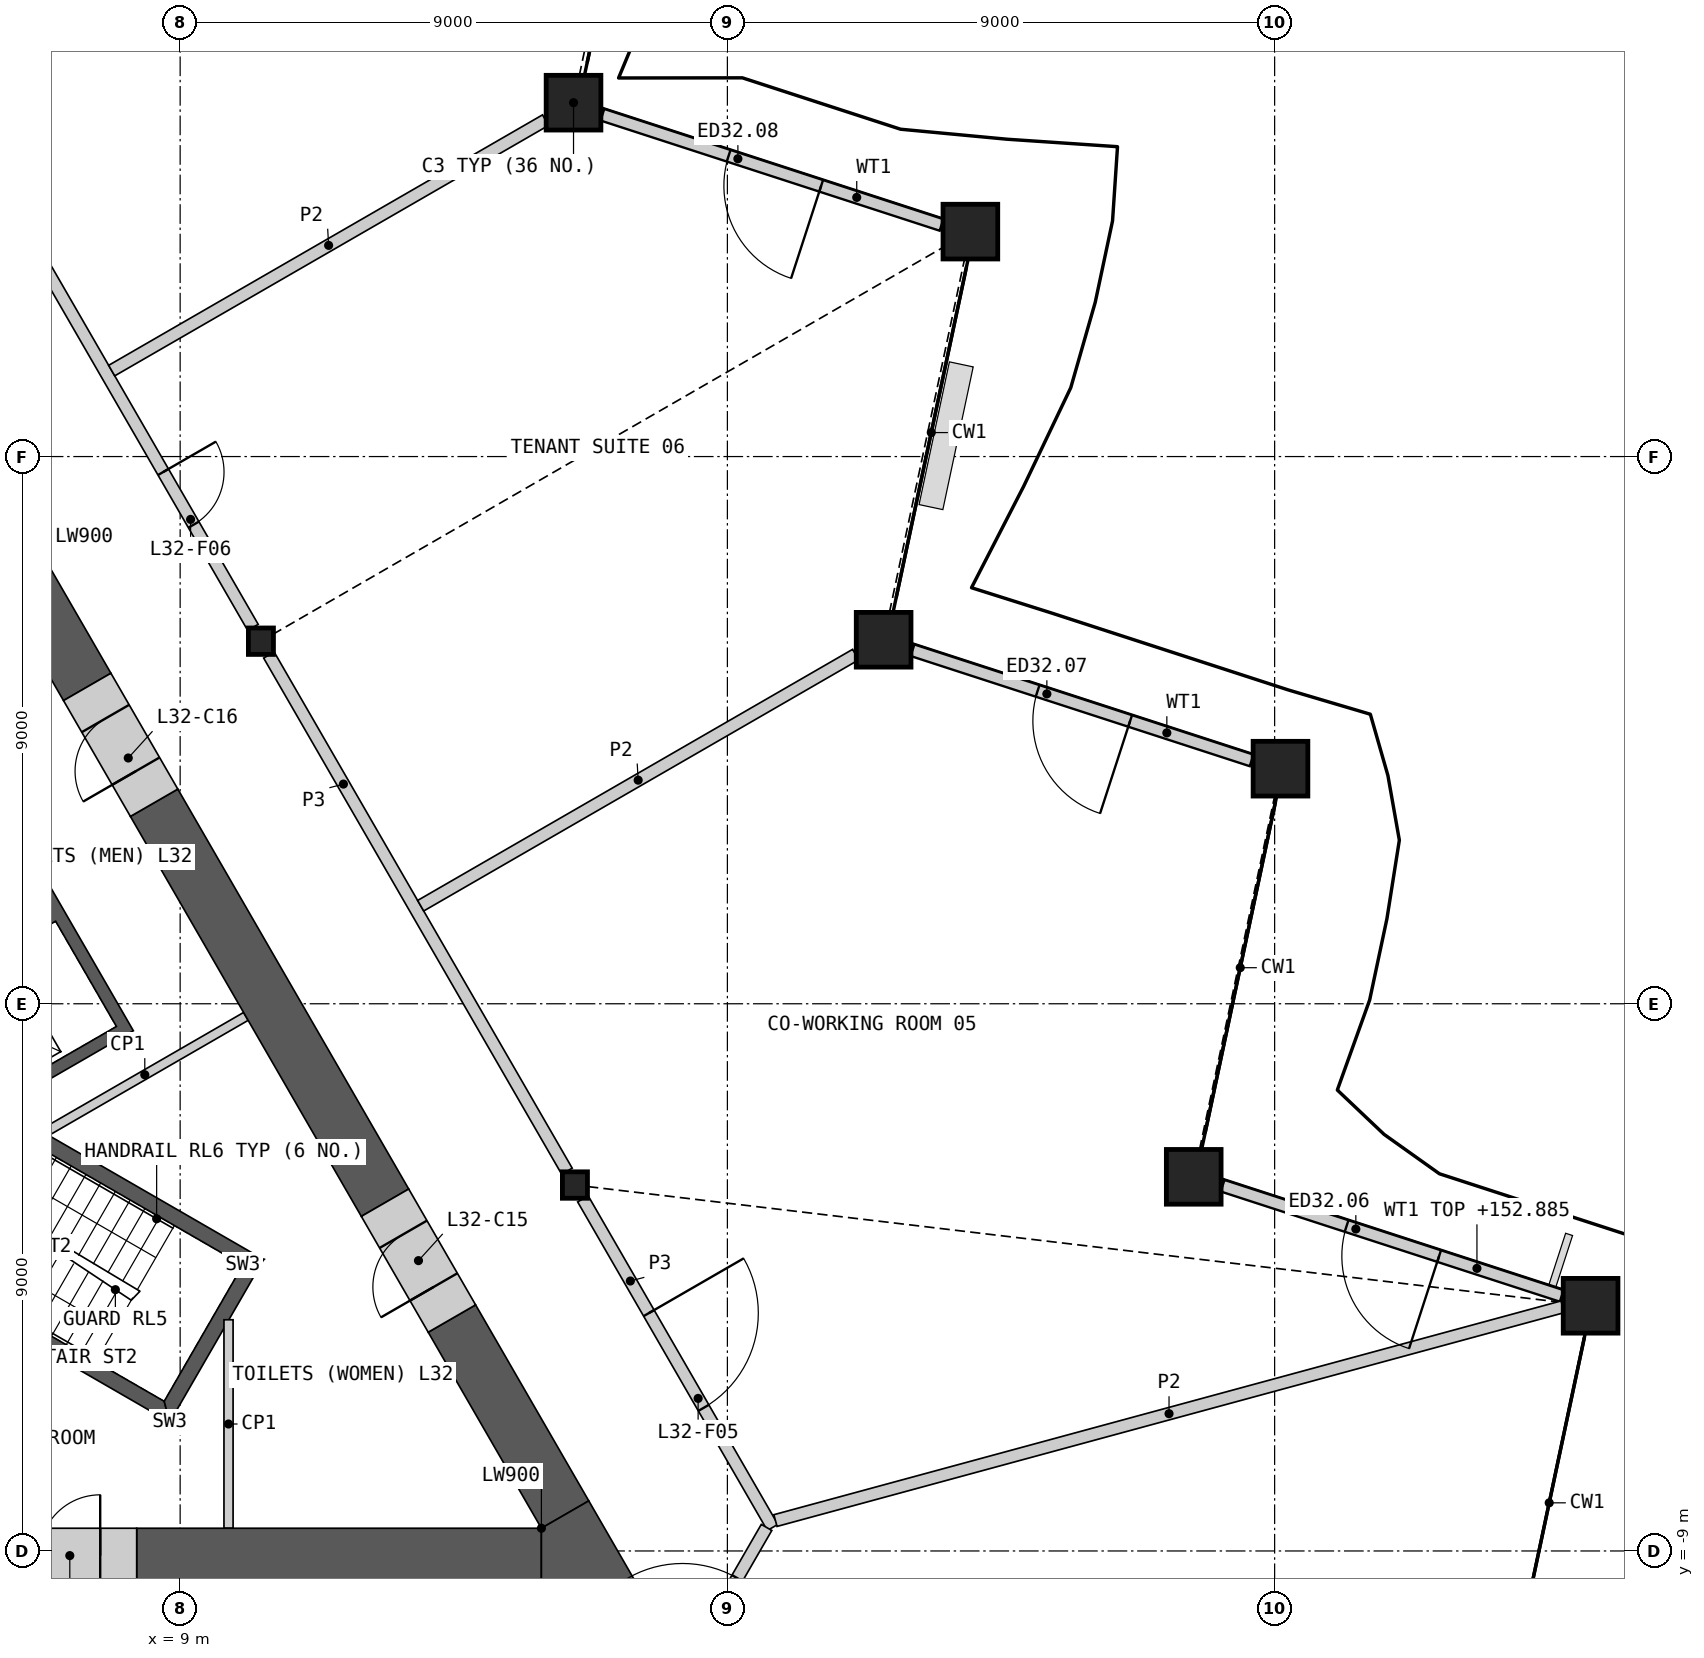
"""IFC4 building model, lengths in metres.
Left out: names, types, materials, properties, quantities, classifications, styles, units other than length and angle.
Written with IfcOpenShell. Run it as: python <this file> out.ifc"""

import sys

from ifc_helpers import new_model, si_unit, direction, frame, frame_2d, origin, origin_2d, place, context, subcontext, project, spatial, polyline, rectangle, hollow_rectangle, i_section, outline, extrude, element, fill, save


model = new_model("IFC4")
c1 = context("Model", 3, precision=1e-05, world=origin(), true_north=direction((0.0, 1.0)))
c2 = subcontext(c1, "Body", "Model", "MODEL_VIEW")
j1 = project(units=[si_unit("LENGTHUNIT", "METRE"), si_unit("PLANEANGLEUNIT", "RADIAN")], contexts=[c1])
p1 = place(None, origin())
s1 = spatial("IfcSite", under=j1, at=p1, CompositionType="ELEMENT")
p2 = place(p1, origin())
s2 = spatial("IfcBuilding", under=s1, at=p2, CompositionType="ELEMENT")
p3 = place(p2, frame((0.0, 0.0, 150.0)))
s3 = spatial("IfcBuildingStorey", under=s2, at=p3, CompositionType="ELEMENT", Elevation=150.0)
for number, where, z_axis, x_axis in (
    (1, (32.196, -4.967, 0.0), (0.0, 0.0, 1.0), (1.0, 0.0, 0.0)),
    (2, (25.669, -2.846, 0.0), (0.0, 0.0, 1.0), (1.0, 0.0, 0.0)),
    (3, (27.096, 3.866, 0.0), (0.0, 0.0, 1.0), (1.0, 0.0, 0.0)),
    (4, (20.57, 5.987, 0.0), (0.0, 0.0, 1.0), (1.0, 0.0, 0.0)),
    (5, (21.996, 12.699, 0.0), (0.0, 0.0, 1.0), (1.0, 0.0, 0.0)),
    (6, (15.469, 14.82, 0.0), (0.0, 0.0, 1.0), (1.0, 0.0, 0.0)),
):
    element("IfcColumn", number, at=place(p3, frame(where, z_axis=z_axis, x_axis=x_axis)), inside=s3, PredefinedType="COLUMN", context=c2, shape_type="SweptSolid", body=[
        extrude(hollow_rectangle(XDim=0.9, YDim=0.9, WallThickness=0.06, at=origin_2d()), origin(), (0.0, 0.0, 1.0), 4.2),
    ])
for number, where, z_axis, x_axis in (
    (7, (15.493, -2.982, 0.0), (0.0, 0.0, 1.0), (1.0, 0.0, 0.0)),
    (8, (10.328, 5.963, 0.0), (0.0, 0.0, 1.0), (1.0, 0.0, 0.0)),
):
    element("IfcColumn", number, at=place(p3, frame(where, z_axis=z_axis, x_axis=x_axis)), inside=s3, PredefinedType="COLUMN", context=c2, shape_type="SweptSolid", body=[
        extrude(i_section(OverallWidth=0.412, OverallDepth=0.435, WebThickness=0.036, FlangeThickness=0.057, at=origin_2d()), origin(), (0.0, 0.0, 1.0), 4.2),
    ])
p4 = place(p3, frame((31.721, -4.805, 0.0), z_axis=(0.0, 0.0, 1.0), x_axis=(-0.951053952554, 0.309024884649, 0.0)))
e9 = element("IfcWall", 9, at=p4, inside=s3, PredefinedType="SOLIDWALL", context=c2, shape_type="SweptSolid", body=[
    extrude(rectangle(XDim=5.865, YDim=0.2, at=frame_2d((2.932, 0.0))), origin(), (0.0, 0.0, 1.0), 2.885),
])
p5 = place(p4, frame((2.12, 0.0, 0.0)))
e10 = element("IfcOpeningElement", 10, at=p5, cuts=e9, PredefinedType="OPENING", context=c2, shape_type="SweptSolid", body=[
    extrude(rectangle(XDim=1.6, YDim=2.4, at=frame_2d((0.8, 1.2))), frame((0.0, 0.11, 0.0), z_axis=(0.0, -1.0, 0.0), x_axis=(1.0, 0.0, 0.0)), (0.0, 0.0, 1.0), 0.22),
])
p6 = place(p3, frame((26.622, 4.002, 0.0), z_axis=(0.0, 0.0, 1.0), x_axis=(-0.951053952554, 0.309024884649, 0.0)))
e11 = element("IfcWall", 11, at=p6, inside=s3, PredefinedType="SOLIDWALL", context=c2, shape_type="SweptSolid", body=[
    extrude(rectangle(XDim=5.865, YDim=0.2, at=frame_2d((2.932, 0.0))), origin(), (0.0, 0.0, 1.0), 3.189),
])
p7 = place(p6, frame((2.101, 0.0, 0.0)))
e12 = element("IfcOpeningElement", 12, at=p7, cuts=e11, PredefinedType="OPENING", context=c2, shape_type="SweptSolid", body=[
    extrude(rectangle(XDim=1.6, YDim=2.4, at=frame_2d((0.8, 1.2))), frame((0.0, 0.11, 0.0), z_axis=(0.0, -1.0, 0.0), x_axis=(1.0, 0.0, 0.0)), (0.0, 0.0, 1.0), 0.22),
])
p8 = place(p3, frame((21.521, 12.81, 0.0), z_axis=(0.0, 0.0, 1.0), x_axis=(-0.951049976734, 0.309037120351, 0.0)))
e13 = element("IfcWall", 13, at=p8, inside=s3, PredefinedType="SOLIDWALL", context=c2, shape_type="SweptSolid", body=[
    extrude(rectangle(XDim=5.864, YDim=0.2, at=frame_2d((2.932, 0.0))), origin(), (0.0, 0.0, 1.0), 3.189),
])
p9 = place(p8, frame((2.081, 0.0, 0.0)))
e14 = element("IfcOpeningElement", 14, at=p9, cuts=e13, PredefinedType="OPENING", context=c2, shape_type="SweptSolid", body=[
    extrude(rectangle(XDim=1.6, YDim=2.4, at=frame_2d((0.8, 1.2))), frame((0.0, 0.11, 0.0), z_axis=(0.0, -1.0, 0.0), x_axis=(1.0, 0.0, 0.0)), (0.0, 0.0, 1.0), 0.22),
])
p10 = place(p3, origin())
e15 = element("IfcWall", 15, at=p10, inside=s3, PredefinedType="SHEAR", context=c2, shape_type="SweptSolid", body=[
    extrude(outline(polyline([(1.561, 6.097), (3.731, 7.35), (8.231, -0.444), (6.061, -1.697), (5.96, -1.524), (7.952, -0.374), (6.952, 1.358), (4.96, 0.208), (4.861, 0.381), (6.852, 1.531), (5.852, 3.263), (3.861, 2.113), (3.76, 2.287), (5.752, 3.437), (4.752, 5.169), (2.76, 4.019), (2.66, 4.192), (4.652, 5.342), (3.652, 7.074), (1.66, 5.924), (1.561, 6.097)])), origin(), (0.0, 0.0, 1.0), 3.8),
])
p11 = place(p3, origin())
e16 = element("IfcWall", 16, at=p11, inside=s3, PredefinedType="SHEAR", context=c2, shape_type="SweptSolid", body=[
    extrude(outline(polyline([(3.763, -3.956), (8.83, -6.881), (8.738, -6.539), (3.888, -3.739), (3.763, -3.956)])), origin(), (0.0, 0.0, 1.0), 3.8),
])
p12 = place(p3, origin())
e17 = element("IfcWall", 17, at=p12, inside=s3, PredefinedType="SHEAR", context=c2, shape_type="SweptSolid", body=[
    extrude(outline(polyline([(8.83, -6.881), (10.374, -4.206), (10.032, -4.298), (8.738, -6.539), (8.83, -6.881)])), origin(), (0.0, 0.0, 1.0), 3.8),
])
p13 = place(p3, origin())
e18 = element("IfcWall", 18, at=p13, inside=s3, PredefinedType="SHEAR", context=c2, shape_type="SweptSolid", body=[
    extrude(outline(polyline([(10.032, -4.298), (10.374, -4.206), (5.307, -1.281), (5.182, -1.498), (10.032, -4.298)])), origin(), (0.0, 0.0, 1.0), 3.8),
])
p14 = place(p3, frame((10.081, -0.208, 0.0), z_axis=(0.0, 0.0, 1.0), x_axis=(-0.86600766878, -0.50003071667, 0.0)))
e19 = element("IfcWall", 19, at=p14, inside=s3, PredefinedType="PARTITIONING", context=c2, shape_type="SweptSolid", body=[
    extrude(rectangle(XDim=3.839, YDim=0.15, at=frame_2d((1.919, 0.0))), origin(), (0.0, 0.0, 1.0), 3.8),
])
p15 = place(p3, frame((9.796, -8.626, 0.0), z_axis=(0.0, 0.0, 1.0), x_axis=(0.0, 1.0, 0.0)))
e20 = element("IfcWall", 20, at=p15, inside=s3, PredefinedType="PARTITIONING", context=c2, shape_type="SweptSolid", body=[
    extrude(rectangle(XDim=3.429, YDim=0.15, at=frame_2d((1.714, 0.0))), origin(), (0.0, 0.0, 1.0), 3.8),
])
p16 = place(p3, frame((8.285, -9.076, 0.0), z_axis=(0.0, 0.0, 1.0), x_axis=(1.0, 0.0, 0.0)))
e21 = element("IfcWall", 21, at=p16, inside=s3, PredefinedType="SHEAR", context=c2, shape_type="SweptSolid", body=[
    extrude(rectangle(XDim=6.656, YDim=0.9, at=frame_2d((3.328, 0.0))), origin(), (0.0, 0.0, 1.0), 3.8),
])
p17 = place(p3, frame((12.369, -3.272, 0.0), z_axis=(0.0, 0.0, 1.0), x_axis=(-0.499986781806, 0.866033035178, 0.0)))
e22 = element("IfcWall", 22, at=p17, inside=s3, PredefinedType="SHEAR", context=c2, shape_type="SweptSolid", body=[
    extrude(rectangle(XDim=7.595, YDim=0.9, at=frame_2d((3.798, 0.0))), origin(), (0.0, 0.0, 1.0), 3.8),
])
p18 = place(p3, frame((7.472, 5.211, 0.0), z_axis=(0.0, 0.0, 1.0), x_axis=(-0.499996693808, 0.866027312607, 0.0)))
e23 = element("IfcWall", 23, at=p18, inside=s3, PredefinedType="SHEAR", context=c2, shape_type="SweptSolid", body=[
    extrude(rectangle(XDim=4.315, YDim=0.9, at=frame_2d((2.158, 0.0))), origin(), (0.0, 0.0, 1.0), 3.8),
])
p19 = place(p3, frame((15.331, -8.401, 0.0), z_axis=(0.0, 0.0, 1.0), x_axis=(-0.499976014784, 0.866039251212, 0.0)))
e24 = element("IfcWall", 24, at=p19, inside=s3, PredefinedType="SHEAR", context=c2, shape_type="SweptSolid", body=[
    extrude(rectangle(XDim=3.723, YDim=0.9, at=frame_2d((1.861, 0.0))), origin(), (0.0, 0.0, 1.0), 3.8),
])
p20 = place(p3, origin())
e25 = element("IfcWall", 25, at=p20, inside=s3, PredefinedType="SHEAR", context=c2, shape_type="SweptSolid", body=[
    extrude(outline(polyline([(14.941, -8.626), (15.721, -8.176), (16.5, -9.526), (14.941, -9.526), (14.941, -8.626)])), origin(), (0.0, 0.0, 1.0), 3.8),
])
p21 = place(p3, frame((6.085, -9.076, 0.0), z_axis=(0.0, 0.0, 1.0), x_axis=(1.0, 0.0, 0.0)))
e26 = element("IfcWall", 26, at=p21, inside=s3, PredefinedType="SHEAR", context=c2, shape_type="SweptSolid", body=[
    extrude(rectangle(XDim=2.2, YDim=0.9, at=frame_2d((1.1, 0.0))), origin(), (0.0, 0.0, 1.0), 3.8),
])
p22 = place(p21, frame((0.6, 0.0, 0.0)))
e27 = element("IfcOpeningElement", 27, at=p22, cuts=e26, PredefinedType="OPENING", context=c2, shape_type="SweptSolid", body=[
    extrude(rectangle(XDim=1.0, YDim=2.1, at=frame_2d((0.5, 1.05))), frame((0.0, 0.46, 0.0), z_axis=(0.0, -1.0, 0.0), x_axis=(1.0, 0.0, 0.0)), (0.0, 0.0, 1.0), 0.92),
])
p23 = place(p3, frame((13.469, -5.177, 0.0), z_axis=(0.0, 0.0, 1.0), x_axis=(-0.50002983664, 0.866008176907, 0.0)))
e28 = element("IfcWall", 28, at=p23, inside=s3, PredefinedType="SHEAR", context=c2, shape_type="SweptSolid", body=[
    extrude(rectangle(XDim=2.2, YDim=0.9, at=frame_2d((1.1, 0.0))), origin(), (0.0, 0.0, 1.0), 3.8),
])
p24 = place(p23, frame((0.6, 0.0, 0.0)))
e29 = element("IfcOpeningElement", 29, at=p24, cuts=e28, PredefinedType="OPENING", context=c2, shape_type="SweptSolid", body=[
    extrude(rectangle(XDim=1.0, YDim=2.1, at=frame_2d((0.5, 1.05))), frame((0.0, 0.46, 0.0), z_axis=(0.0, -1.0, 0.0), x_axis=(1.0, 0.0, 0.0)), (0.0, 0.0, 1.0), 0.92),
])
p25 = place(p3, frame((8.572, 3.306, 0.0), z_axis=(0.0, 0.0, 1.0), x_axis=(-0.50002983664, 0.866008176907, 0.0)))
e30 = element("IfcWall", 30, at=p25, inside=s3, PredefinedType="SHEAR", context=c2, shape_type="SweptSolid", body=[
    extrude(rectangle(XDim=2.2, YDim=0.9, at=frame_2d((1.1, 0.0))), origin(), (0.0, 0.0, 1.0), 3.8),
])
p26 = place(p25, frame((0.6, 0.0, 0.0)))
e31 = element("IfcOpeningElement", 31, at=p26, cuts=e30, PredefinedType="OPENING", context=c2, shape_type="SweptSolid", body=[
    extrude(rectangle(XDim=1.0, YDim=2.1, at=frame_2d((0.5, 1.05))), frame((0.0, 0.46, 0.0), z_axis=(0.0, -1.0, 0.0), x_axis=(1.0, 0.0, 0.0)), (0.0, 0.0, 1.0), 0.92),
])
p27 = place(p3, frame((10.46, 5.736, 0.0), z_axis=(0.0, 0.0, 1.0), x_axis=(0.500004141693, -0.866023012564, 0.0)))
e32 = element("IfcWall", 32, at=p27, inside=s3, PredefinedType="PARTITIONING", context=c2, shape_type="SweptSolid", body=[
    extrude(rectangle(XDim=9.803, YDim=0.2, at=frame_2d((4.902, 0.0))), origin(), (0.0, 0.0, 1.0), 3.8),
])
p28 = place(p3, frame((5.295, 14.68, 0.0), z_axis=(0.0, 0.0, 1.0), x_axis=(0.500012035596, -0.866018454918, 0.0)))
e33 = element("IfcWall", 33, at=p28, inside=s3, PredefinedType="PARTITIONING", context=c2, shape_type="SweptSolid", body=[
    extrude(rectangle(XDim=9.803, YDim=0.2, at=frame_2d((4.902, 0.0))), origin(), (0.0, 0.0, 1.0), 3.8),
])
p29 = place(p28, frame((6.853, 0.0, 0.0)))
e34 = element("IfcOpeningElement", 34, at=p29, cuts=e33, PredefinedType="OPENING", context=c2, shape_type="SweptSolid", body=[
    extrude(rectangle(XDim=1.0, YDim=2.1, at=frame_2d((0.5, 1.05))), frame((0.0, 0.11, 0.0), z_axis=(0.0, -1.0, 0.0), x_axis=(1.0, 0.0, 0.0)), (0.0, 0.0, 1.0), 0.22),
])
p30 = place(p3, frame((15.624, -3.209, 0.0), z_axis=(0.0, 0.0, 1.0), x_axis=(0.499997920671, -0.866026604282, 0.0)))
e35 = element("IfcWall", 35, at=p30, inside=s3, PredefinedType="PARTITIONING", context=c2, shape_type="SweptSolid", body=[
    extrude(rectangle(XDim=6.24, YDim=0.2, at=frame_2d((3.12, 0.0))), origin(), (0.0, 0.0, 1.0), 3.8),
])
p31 = place(p30, frame((2.169, 0.0, 0.0)))
e36 = element("IfcOpeningElement", 36, at=p31, cuts=e35, PredefinedType="OPENING", context=c2, shape_type="SweptSolid", body=[
    extrude(rectangle(XDim=1.8, YDim=2.1, at=frame_2d((0.9, 1.05))), frame((0.0, 0.11, 0.0), z_axis=(0.0, -1.0, 0.0), x_axis=(1.0, 0.0, 0.0)), (0.0, 0.0, 1.0), 0.22),
])
p32 = place(p3, frame((16.781, -11.84, 0.0), z_axis=(0.0, 0.0, 1.0), x_axis=(0.499958791762, 0.866049194065, 0.0)))
e37 = element("IfcWall", 37, at=p32, inside=s3, PredefinedType="PARTITIONING", context=c2, shape_type="SweptSolid", body=[
    extrude(rectangle(XDim=3.726, YDim=0.2, at=frame_2d((1.863, 0.0))), origin(), (0.0, 0.0, 1.0), 3.8),
])
p33 = place(p32, frame((0.963, 0.0, 0.0)))
e38 = element("IfcOpeningElement", 38, at=p33, cuts=e37, PredefinedType="OPENING", context=c2, shape_type="SweptSolid", body=[
    extrude(rectangle(XDim=1.8, YDim=2.1, at=frame_2d((0.9, 1.05))), frame((0.0, 0.11, 0.0), z_axis=(0.0, -1.0, 0.0), x_axis=(1.0, 0.0, 0.0)), (0.0, 0.0, 1.0), 0.22),
])
p34 = place(p3, frame((18.79, -8.5, 0.0), z_axis=(0.0, 0.0, 1.0), x_axis=(0.965038802525, 0.262107057556, 0.0)))
e39 = element("IfcWall", 39, at=p34, inside=s3, PredefinedType="PARTITIONING", context=c2, shape_type="SweptSolid", body=[
    extrude(rectangle(XDim=13.415, YDim=0.2, at=frame_2d((6.708, 0.0))), origin(), (0.0, 0.0, 1.0), 2.885),
])
p35 = place(p3, frame((12.956, 1.613, 0.0), z_axis=(0.0, 0.0, 1.0), x_axis=(0.866032027724, 0.499988526824, 0.0)))
e40 = element("IfcWall", 40, at=p35, inside=s3, PredefinedType="PARTITIONING", context=c2, shape_type="SweptSolid", body=[
    extrude(rectangle(XDim=8.26, YDim=0.2, at=frame_2d((4.13, 0.0))), origin(), (0.0, 0.0, 1.0), 2.885),
])
p36 = place(p3, frame((7.875, 10.414, 0.0), z_axis=(0.0, 0.0, 1.0), x_axis=(0.866026194422, 0.499998630573, 0.0)))
e41 = element("IfcWall", 41, at=p36, inside=s3, PredefinedType="PARTITIONING", context=c2, shape_type="SweptSolid", body=[
    extrude(rectangle(XDim=8.239, YDim=0.2, at=frame_2d((4.119, 0.0))), origin(), (0.0, 0.0, 1.0), 2.885),
])
p37 = place(p5, origin())
e42 = element("IfcDoor", 42, at=p37, inside=s3, OperationType="DOUBLE_DOOR_SINGLE_SWING", PredefinedType="DOOR", context=c2, shape_type="SweptSolid", body=[
    extrude(rectangle(XDim=1.6, YDim=2.4, at=frame_2d((0.8, 1.2))), frame((0.0, 0.025, 0.0), z_axis=(0.0, -1.0, 0.0), x_axis=(1.0, 0.0, 0.0)), (0.0, 0.0, 1.0), 0.05),
])
fill(e10, e42)
p38 = place(p7, origin())
e43 = element("IfcDoor", 43, at=p38, inside=s3, OperationType="DOUBLE_DOOR_SINGLE_SWING", PredefinedType="DOOR", context=c2, shape_type="SweptSolid", body=[
    extrude(rectangle(XDim=1.6, YDim=2.4, at=frame_2d((0.8, 1.2))), frame((0.0, 0.025, 0.0), z_axis=(0.0, -1.0, 0.0), x_axis=(1.0, 0.0, 0.0)), (0.0, 0.0, 1.0), 0.05),
])
fill(e12, e43)
p39 = place(p9, origin())
e44 = element("IfcDoor", 44, at=p39, inside=s3, OperationType="DOUBLE_DOOR_SINGLE_SWING", PredefinedType="DOOR", context=c2, shape_type="SweptSolid", body=[
    extrude(rectangle(XDim=1.6, YDim=2.4, at=frame_2d((0.8, 1.2))), frame((0.0, 0.025, 0.0), z_axis=(0.0, -1.0, 0.0), x_axis=(1.0, 0.0, 0.0)), (0.0, 0.0, 1.0), 0.05),
])
fill(e14, e44)
p40 = place(p22, origin())
e45 = element("IfcDoor", 45, at=p40, inside=s3, OperationType="SINGLE_SWING_RIGHT", PredefinedType="DOOR", context=c2, shape_type="SweptSolid", body=[
    extrude(rectangle(XDim=1.0, YDim=2.1, at=frame_2d((0.5, 1.05))), frame((0.0, 0.205, 0.0), z_axis=(0.0, -1.0, 0.0), x_axis=(1.0, 0.0, 0.0)), (0.0, 0.0, 1.0), 0.05),
])
fill(e27, e45)
p41 = place(p24, origin())
e46 = element("IfcDoor", 46, at=p41, inside=s3, OperationType="SINGLE_SWING_LEFT", PredefinedType="DOOR", context=c2, shape_type="SweptSolid", body=[
    extrude(rectangle(XDim=1.0, YDim=2.1, at=frame_2d((0.5, 1.05))), frame((0.0, 0.205, 0.0), z_axis=(0.0, -1.0, 0.0), x_axis=(1.0, 0.0, 0.0)), (0.0, 0.0, 1.0), 0.05),
])
fill(e29, e46)
p42 = place(p26, origin())
e47 = element("IfcDoor", 47, at=p42, inside=s3, OperationType="SINGLE_SWING_LEFT", PredefinedType="DOOR", context=c2, shape_type="SweptSolid", body=[
    extrude(rectangle(XDim=1.0, YDim=2.1, at=frame_2d((0.5, 1.05))), frame((0.0, 0.205, 0.0), z_axis=(0.0, -1.0, 0.0), x_axis=(1.0, 0.0, 0.0)), (0.0, 0.0, 1.0), 0.05),
])
fill(e31, e47)
p43 = place(p33, origin())
e48 = element("IfcDoor", 48, at=p43, inside=s3, OperationType="DOUBLE_DOOR_SINGLE_SWING", PredefinedType="DOOR", context=c2, shape_type="SweptSolid", body=[
    extrude(rectangle(XDim=1.8, YDim=2.1, at=frame_2d((0.9, 1.05))), frame((0.0, 0.025, 0.0), z_axis=(0.0, -1.0, 0.0), x_axis=(1.0, 0.0, 0.0)), (0.0, 0.0, 1.0), 0.05),
])
fill(e38, e48)
p44 = place(p31, origin())
e49 = element("IfcDoor", 49, at=p44, inside=s3, OperationType="DOUBLE_DOOR_SINGLE_SWING", PredefinedType="DOOR", context=c2, shape_type="SweptSolid", body=[
    extrude(rectangle(XDim=1.8, YDim=2.1, at=frame_2d((0.9, 1.05))), frame((0.0, 0.025, 0.0), z_axis=(0.0, -1.0, 0.0), x_axis=(1.0, 0.0, 0.0)), (0.0, 0.0, 1.0), 0.05),
])
fill(e36, e49)
p45 = place(p29, origin())
e50 = element("IfcDoor", 50, at=p45, inside=s3, OperationType="SINGLE_SWING_LEFT", PredefinedType="DOOR", context=c2, shape_type="SweptSolid", body=[
    extrude(rectangle(XDim=1.0, YDim=2.1, at=frame_2d((0.5, 1.05))), frame((0.0, 0.025, 0.0), z_axis=(0.0, -1.0, 0.0), x_axis=(1.0, 0.0, 0.0)), (0.0, 0.0, 1.0), 0.05),
])
fill(e34, e50)
save(model, sys.argv[1])
